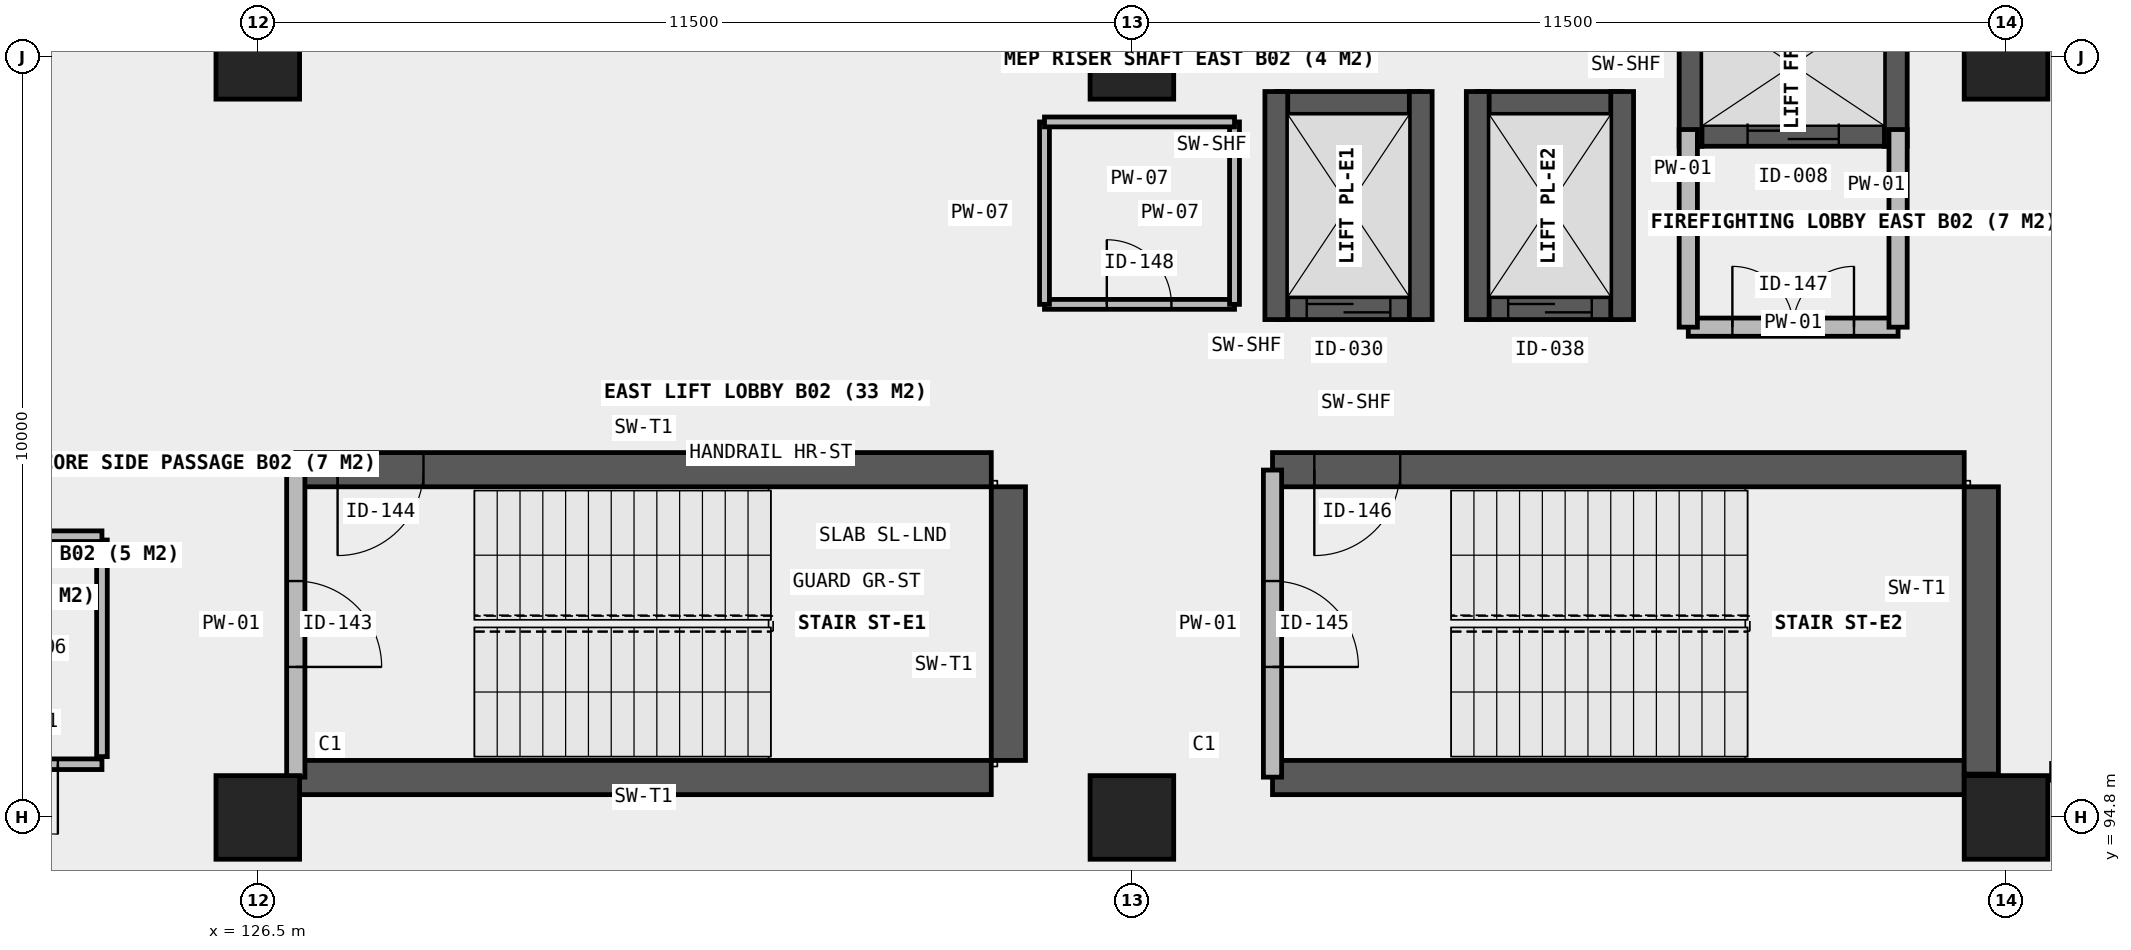
"""IFC4 building model, lengths in metres.
Left out: names, types, materials, properties, quantities, classifications, styles, units other than length and angle.
Written with IfcOpenShell. Run it as: python <this file> out.ifc"""

import sys

from ifc_helpers import new_model, si_unit, direction, frame, frame_2d, origin, origin_2d, place, context, subcontext, project, spatial, rectangle, extrude, element, fill, save


model = new_model("IFC4")
c1 = context("Model", 3, precision=1e-05, world=origin(), true_north=direction((0.0, 1.0)))
c2 = subcontext(c1, "Body", "Model", "MODEL_VIEW")
j1 = project(units=[si_unit("LENGTHUNIT", "METRE"), si_unit("PLANEANGLEUNIT", "RADIAN")], contexts=[c1])
p1 = place(None, origin())
s1 = spatial("IfcSite", under=j1, at=p1, CompositionType="ELEMENT")
p2 = place(p1, origin())
s2 = spatial("IfcBuilding", under=s1, at=p2, CompositionType="ELEMENT")
p3 = place(p2, frame((0.0, 0.0, -8.4)))
s3 = spatial("IfcBuildingStorey", under=s2, at=p3, CompositionType="ELEMENT", Elevation=-8.4)
for number, where, z_axis, x_axis in (
    (1, (126.5, 94.8, 0.0), (0.0, 0.0, 1.0), (1.0, 0.0, 0.0)),
    (2, (126.5, 104.8, 0.0), (0.0, 0.0, 1.0), (1.0, 0.0, 0.0)),
    (3, (138.0, 94.8, 0.0), (0.0, 0.0, 1.0), (1.0, 0.0, 0.0)),
    (4, (138.0, 104.8, 0.0), (0.0, 0.0, 1.0), (1.0, 0.0, 0.0)),
    (5, (149.5, 94.8, 0.0), (0.0, 0.0, 1.0), (1.0, 0.0, 0.0)),
    (6, (149.5, 104.8, 0.0), (0.0, 0.0, 1.0), (1.0, 0.0, 0.0)),
):
    element("IfcColumn", number, at=place(p3, frame(where, z_axis=z_axis, x_axis=x_axis)), inside=s3, PredefinedType="COLUMN", context=c2, shape_type="SweptSolid", body=[
        extrude(rectangle(XDim=1.1, YDim=1.1, at=origin_2d()), origin(), (0.0, 0.0, 1.0), 4.2),
    ])
p4 = place(p3, frame((145.35, 103.78, 0.0), z_axis=(0.0, 0.0, 1.0), x_axis=(1.0, 0.0, 0.0)))
e7 = element("IfcWall", 7, at=p4, inside=s3, PredefinedType="SHEAR", context=c2, shape_type="SweptSolid", body=[
    extrude(rectangle(XDim=2.7, YDim=0.3, at=frame_2d((1.35, 0.0))), origin(), (0.0, 0.0, 1.0), 4.2),
])
p5 = place(p4, frame((0.75, 0.0, 0.0)))
e8 = element("IfcOpeningElement", 8, at=p5, cuts=e7, PredefinedType="OPENING", context=c2, shape_type="SweptSolid", body=[
    extrude(rectangle(XDim=1.2, YDim=2.15, at=frame_2d((0.6, 1.075))), frame((0.0, 0.16, 0.0), z_axis=(0.0, -1.0, 0.0), x_axis=(1.0, 0.0, 0.0)), (0.0, 0.0, 1.0), 0.32),
])
for number, where, z_axis, x_axis in (
    (9, (145.35, 103.63, 0.0), (0.0, 0.0, 1.0), (0.0, 1.0, 0.0)),
    (10, (148.05, 103.63, 0.0), (0.0, 0.0, 1.0), (0.0, 1.0, 0.0)),
):
    element("IfcWall", number, at=place(p3, frame(where, z_axis=z_axis, x_axis=x_axis)), inside=s3, PredefinedType="SHEAR", context=c2, shape_type="SweptSolid", body=[
        extrude(rectangle(XDim=2.14, YDim=0.3, at=frame_2d((1.07, 0.0))), origin(), (0.0, 0.0, 1.0), 4.2),
    ])
p6 = place(p3, frame((139.9, 101.5, 0.0), z_axis=(0.0, 0.0, 1.0), x_axis=(1.0, 0.0, 0.0)))
e11 = element("IfcWall", 11, at=p6, inside=s3, PredefinedType="SHEAR", context=c2, shape_type="SweptSolid", body=[
    extrude(rectangle(XDim=1.9, YDim=0.3, at=frame_2d((0.95, 0.0))), origin(), (0.0, 0.0, 1.0), 4.2),
])
p7 = place(p6, frame((0.4, 0.0, 0.0)))
e12 = element("IfcOpeningElement", 12, at=p7, cuts=e11, PredefinedType="OPENING", context=c2, shape_type="SweptSolid", body=[
    extrude(rectangle(XDim=1.1, YDim=2.15, at=frame_2d((0.55, 1.075))), frame((0.0, 0.16, 0.0), z_axis=(0.0, -1.0, 0.0), x_axis=(1.0, 0.0, 0.0)), (0.0, 0.0, 1.0), 0.32),
])
p8 = place(p3, frame((139.9, 104.2, 0.0), z_axis=(0.0, 0.0, 1.0), x_axis=(1.0, 0.0, 0.0)))
e13 = element("IfcWall", 13, at=p8, inside=s3, PredefinedType="SHEAR", context=c2, shape_type="SweptSolid", body=[
    extrude(rectangle(XDim=1.9, YDim=0.3, at=frame_2d((0.95, 0.0))), origin(), (0.0, 0.0, 1.0), 4.2),
])
for number, where, z_axis, x_axis in (
    (14, (139.9, 101.35, 0.0), (0.0, 0.0, 1.0), (0.0, 1.0, 0.0)),
    (15, (141.8, 101.35, 0.0), (0.0, 0.0, 1.0), (0.0, 1.0, 0.0)),
):
    element("IfcWall", number, at=place(p3, frame(where, z_axis=z_axis, x_axis=x_axis)), inside=s3, PredefinedType="SHEAR", context=c2, shape_type="SweptSolid", body=[
        extrude(rectangle(XDim=3.0, YDim=0.3, at=frame_2d((1.5, 0.0))), origin(), (0.0, 0.0, 1.0), 4.2),
    ])
p9 = place(p3, frame((142.55, 101.5, 0.0), z_axis=(0.0, 0.0, 1.0), x_axis=(1.0, 0.0, 0.0)))
e16 = element("IfcWall", 16, at=p9, inside=s3, PredefinedType="SHEAR", context=c2, shape_type="SweptSolid", body=[
    extrude(rectangle(XDim=1.9, YDim=0.3, at=frame_2d((0.95, 0.0))), origin(), (0.0, 0.0, 1.0), 4.2),
])
p10 = place(p9, frame((0.4, 0.0, 0.0)))
e17 = element("IfcOpeningElement", 17, at=p10, cuts=e16, PredefinedType="OPENING", context=c2, shape_type="SweptSolid", body=[
    extrude(rectangle(XDim=1.1, YDim=2.15, at=frame_2d((0.55, 1.075))), frame((0.0, 0.16, 0.0), z_axis=(0.0, -1.0, 0.0), x_axis=(1.0, 0.0, 0.0)), (0.0, 0.0, 1.0), 0.32),
])
p11 = place(p3, frame((142.55, 104.2, 0.0), z_axis=(0.0, 0.0, 1.0), x_axis=(1.0, 0.0, 0.0)))
e18 = element("IfcWall", 18, at=p11, inside=s3, PredefinedType="SHEAR", context=c2, shape_type="SweptSolid", body=[
    extrude(rectangle(XDim=1.9, YDim=0.3, at=frame_2d((0.95, 0.0))), origin(), (0.0, 0.0, 1.0), 4.2),
])
for number, where, z_axis, x_axis in (
    (19, (142.55, 101.35, 0.0), (0.0, 0.0, 1.0), (0.0, 1.0, 0.0)),
    (20, (144.45, 101.35, 0.0), (0.0, 0.0, 1.0), (0.0, 1.0, 0.0)),
):
    element("IfcWall", number, at=place(p3, frame(where, z_axis=z_axis, x_axis=x_axis)), inside=s3, PredefinedType="SHEAR", context=c2, shape_type="SweptSolid", body=[
        extrude(rectangle(XDim=3.0, YDim=0.3, at=frame_2d((1.5, 0.0))), origin(), (0.0, 0.0, 1.0), 4.2),
    ])
p12 = place(p3, frame((127.0, 95.325, 0.0), z_axis=(0.0, 0.0, 1.0), x_axis=(1.0, 0.0, 0.0)))
e21 = element("IfcWall", 21, at=p12, inside=s3, PredefinedType="SHEAR", context=c2, shape_type="SweptSolid", body=[
    extrude(rectangle(XDim=9.15, YDim=0.45, at=frame_2d((4.575, 0.0))), origin(), (0.0, 0.0, 1.0), 4.2),
])
p13 = place(p3, frame((127.0, 99.375, 0.0), z_axis=(0.0, 0.0, 1.0), x_axis=(1.0, 0.0, 0.0)))
e22 = element("IfcWall", 22, at=p13, inside=s3, PredefinedType="SHEAR", context=c2, shape_type="SweptSolid", body=[
    extrude(rectangle(XDim=9.15, YDim=0.45, at=frame_2d((4.575, 0.0))), origin(), (0.0, 0.0, 1.0), 4.2),
])
p14 = place(p13, frame((0.55, 0.0, 0.0)))
e23 = element("IfcOpeningElement", 23, at=p14, cuts=e22, PredefinedType="OPENING", context=c2, shape_type="SweptSolid", body=[
    extrude(rectangle(XDim=1.13, YDim=2.15, at=frame_2d((0.565, 1.075))), frame((0.0, 0.235, 0.0), z_axis=(0.0, -1.0, 0.0), x_axis=(1.0, 0.0, 0.0)), (0.0, 0.0, 1.0), 0.47),
])
p15 = place(p3, frame((136.375, 95.55, 0.0), z_axis=(0.0, 0.0, 1.0), x_axis=(0.0, 1.0, 0.0)))
e24 = element("IfcWall", 24, at=p15, inside=s3, PredefinedType="SHEAR", context=c2, shape_type="SweptSolid", body=[
    extrude(rectangle(XDim=3.6, YDim=0.45, at=frame_2d((1.8, 0.0))), origin(), (0.0, 0.0, 1.0), 4.2),
])
p16 = place(p3, frame((139.85, 95.325, 0.0), z_axis=(0.0, 0.0, 1.0), x_axis=(1.0, 0.0, 0.0)))
e25 = element("IfcWall", 25, at=p16, inside=s3, PredefinedType="SHEAR", context=c2, shape_type="SweptSolid", body=[
    extrude(rectangle(XDim=9.1, YDim=0.45, at=frame_2d((4.55, 0.0))), origin(), (0.0, 0.0, 1.0), 4.2),
])
p17 = place(p3, frame((139.85, 99.375, 0.0), z_axis=(0.0, 0.0, 1.0), x_axis=(1.0, 0.0, 0.0)))
e26 = element("IfcWall", 26, at=p17, inside=s3, PredefinedType="SHEAR", context=c2, shape_type="SweptSolid", body=[
    extrude(rectangle(XDim=9.1, YDim=0.45, at=frame_2d((4.55, 0.0))), origin(), (0.0, 0.0, 1.0), 4.2),
])
p18 = place(p17, frame((0.55, 0.0, 0.0)))
e27 = element("IfcOpeningElement", 27, at=p18, cuts=e26, PredefinedType="OPENING", context=c2, shape_type="SweptSolid", body=[
    extrude(rectangle(XDim=1.13, YDim=2.15, at=frame_2d((0.565, 1.075))), frame((0.0, 0.235, 0.0), z_axis=(0.0, -1.0, 0.0), x_axis=(1.0, 0.0, 0.0)), (0.0, 0.0, 1.0), 0.47),
])
p19 = place(p3, frame((149.175, 95.37, 0.0), z_axis=(0.0, 0.0, 1.0), x_axis=(0.0, 1.0, 0.0)))
e28 = element("IfcWall", 28, at=p19, inside=s3, PredefinedType="SHEAR", context=c2, shape_type="SweptSolid", body=[
    extrude(rectangle(XDim=3.78, YDim=0.45, at=frame_2d((1.89, 0.0))), origin(), (0.0, 0.0, 1.0), 4.2),
])
p20 = place(p3, frame((127.0, 95.33, 0.0), z_axis=(0.0, 0.0, 1.0), x_axis=(0.0, 1.0, 0.0)))
e29 = element("IfcWall", 29, at=p20, inside=s3, PredefinedType="SOLIDWALL", context=c2, shape_type="SweptSolid", body=[
    extrude(rectangle(XDim=4.04, YDim=0.24, at=frame_2d((2.02, 0.0))), origin(), (0.0, 0.0, 1.0), 3.9),
])
p21 = place(p20, frame((1.45, 0.0, 0.0)))
e30 = element("IfcOpeningElement", 30, at=p21, cuts=e29, PredefinedType="OPENING", context=c2, shape_type="SweptSolid", body=[
    extrude(rectangle(XDim=1.13, YDim=2.15, at=frame_2d((0.565, 1.075))), frame((0.0, 0.13, 0.0), z_axis=(0.0, -1.0, 0.0), x_axis=(1.0, 0.0, 0.0)), (0.0, 0.0, 1.0), 0.26),
])
p22 = place(p3, frame((139.85, 95.33, 0.0), z_axis=(0.0, 0.0, 1.0), x_axis=(0.0, 1.0, 0.0)))
e31 = element("IfcWall", 31, at=p22, inside=s3, PredefinedType="SOLIDWALL", context=c2, shape_type="SweptSolid", body=[
    extrude(rectangle(XDim=4.04, YDim=0.24, at=frame_2d((2.02, 0.0))), origin(), (0.0, 0.0, 1.0), 3.9),
])
p23 = place(p22, frame((1.45, 0.0, 0.0)))
e32 = element("IfcOpeningElement", 32, at=p23, cuts=e31, PredefinedType="OPENING", context=c2, shape_type="SweptSolid", body=[
    extrude(rectangle(XDim=1.13, YDim=2.15, at=frame_2d((0.565, 1.075))), frame((0.0, 0.13, 0.0), z_axis=(0.0, -1.0, 0.0), x_axis=(1.0, 0.0, 0.0)), (0.0, 0.0, 1.0), 0.26),
])
p24 = place(p3, frame((145.32, 101.25, 0.0), z_axis=(0.0, 0.0, 1.0), x_axis=(1.0, 0.0, 0.0)))
e33 = element("IfcWall", 33, at=p24, inside=s3, PredefinedType="SOLIDWALL", context=c2, shape_type="SweptSolid", body=[
    extrude(rectangle(XDim=2.76, YDim=0.24, at=frame_2d((1.38, 0.0))), origin(), (0.0, 0.0, 1.0), 3.9),
])
p25 = place(p24, frame((0.58, 0.0, 0.0)))
e34 = element("IfcOpeningElement", 34, at=p25, cuts=e33, PredefinedType="OPENING", context=c2, shape_type="SweptSolid", body=[
    extrude(rectangle(XDim=1.6, YDim=2.15, at=frame_2d((0.8, 1.075))), frame((0.0, 0.13, 0.0), z_axis=(0.0, -1.0, 0.0), x_axis=(1.0, 0.0, 0.0)), (0.0, 0.0, 1.0), 0.26),
])
for number, where, z_axis, x_axis in (
    (35, (145.32, 101.25, 0.0), (0.0, 0.0, 1.0), (0.0, 1.0, 0.0)),
    (36, (148.08, 101.25, 0.0), (0.0, 0.0, 1.0), (0.0, 1.0, 0.0)),
):
    element("IfcWall", number, at=place(p3, frame(where, z_axis=z_axis, x_axis=x_axis)), inside=s3, PredefinedType="SOLIDWALL", context=c2, shape_type="SweptSolid", body=[
        extrude(rectangle(XDim=2.6, YDim=0.24, at=frame_2d((1.3, 0.0))), origin(), (0.0, 0.0, 1.0), 3.9),
    ])
p26 = place(p3, frame((136.85, 101.55, 0.0), z_axis=(0.0, 0.0, 1.0), x_axis=(1.0, 0.0, 0.0)))
e37 = element("IfcWall", 37, at=p26, inside=s3, PredefinedType="PLUMBINGWALL", context=c2, shape_type="SweptSolid", body=[
    extrude(rectangle(XDim=2.5, YDim=0.13, at=frame_2d((1.25, 0.0))), origin(), (0.0, 0.0, 1.0), 3.9),
])
p27 = place(p26, frame((0.82, 0.0, 0.0)))
e38 = element("IfcOpeningElement", 38, at=p27, cuts=e37, PredefinedType="OPENING", context=c2, shape_type="SweptSolid", body=[
    extrude(rectangle(XDim=0.85, YDim=2.0, at=frame_2d((0.425, 1.0))), frame((0.0, 0.075, 0.0), z_axis=(0.0, -1.0, 0.0), x_axis=(1.0, 0.0, 0.0)), (0.0, 0.0, 1.0), 0.15),
])
for number, where, z_axis, x_axis in (
    (39, (136.85, 101.55, 0.0), (0.0, 0.0, 1.0), (0.0, 1.0, 0.0)),
    (40, (139.35, 101.55, 0.0), (0.0, 0.0, 1.0), (0.0, 1.0, 0.0)),
):
    element("IfcWall", number, at=place(p3, frame(where, z_axis=z_axis, x_axis=x_axis)), inside=s3, PredefinedType="PLUMBINGWALL", context=c2, shape_type="SweptSolid", body=[
        extrude(rectangle(XDim=2.4, YDim=0.13, at=frame_2d((1.2, 0.0))), origin(), (0.0, 0.0, 1.0), 3.9),
    ])
p28 = place(p3, frame((136.85, 103.95, 0.0), z_axis=(0.0, 0.0, 1.0), x_axis=(1.0, 0.0, 0.0)))
e41 = element("IfcWall", 41, at=p28, inside=s3, PredefinedType="PLUMBINGWALL", context=c2, shape_type="SweptSolid", body=[
    extrude(rectangle(XDim=2.5, YDim=0.13, at=frame_2d((1.25, 0.0))), origin(), (0.0, 0.0, 1.0), 3.9),
])
p29 = place(p3, frame((118.15, 95.5, 0.0), z_axis=(0.0, 0.0, 1.0), x_axis=(1.0, 0.0, 0.0)))
e42 = element("IfcWall", 42, at=p29, inside=s3, PredefinedType="PLUMBINGWALL", context=c2, shape_type="SweptSolid", body=[
    extrude(rectangle(XDim=6.3, YDim=0.14, at=frame_2d((3.15, 0.0))), origin(), (0.0, 0.0, 1.0), 3.9),
])
p30 = place(p29, frame((0.72, 0.0, 0.0)))
e43 = element("IfcOpeningElement", 43, at=p30, cuts=e42, PredefinedType="OPENING", context=c2, shape_type="SweptSolid", body=[
    extrude(rectangle(XDim=0.95, YDim=2.1, at=frame_2d((0.475, 1.05))), frame((0.0, 0.08, 0.0), z_axis=(0.0, -1.0, 0.0), x_axis=(1.0, 0.0, 0.0)), (0.0, 0.0, 1.0), 0.16),
])
p31 = place(p29, frame((2.8, 0.0, 0.0)))
e44 = element("IfcOpeningElement", 44, at=p31, cuts=e42, PredefinedType="OPENING", context=c2, shape_type="SweptSolid", body=[
    extrude(rectangle(XDim=0.92, YDim=2.1, at=frame_2d((0.46, 1.05))), frame((0.0, 0.08, 0.0), z_axis=(0.0, -1.0, 0.0), x_axis=(1.0, 0.0, 0.0)), (0.0, 0.0, 1.0), 0.16),
])
p32 = place(p29, frame((4.8, 0.0, 0.0)))
e45 = element("IfcOpeningElement", 45, at=p32, cuts=e42, PredefinedType="OPENING", context=c2, shape_type="SweptSolid", body=[
    extrude(rectangle(XDim=0.92, YDim=2.1, at=frame_2d((0.46, 1.05))), frame((0.0, 0.08, 0.0), z_axis=(0.0, -1.0, 0.0), x_axis=(1.0, 0.0, 0.0)), (0.0, 0.0, 1.0), 0.16),
])
p33 = place(p3, frame((124.45, 95.6, 0.0), z_axis=(0.0, 0.0, 1.0), x_axis=(0.0, 1.0, 0.0)))
e46 = element("IfcWall", 46, at=p33, inside=s3, PredefinedType="PLUMBINGWALL", context=c2, shape_type="SweptSolid", body=[
    extrude(rectangle(XDim=2.85, YDim=0.14, at=frame_2d((1.425, 0.0))), origin(), (0.0, 0.0, 1.0), 3.9),
])
p34 = place(p3, frame((118.15, 98.5, 0.0), z_axis=(0.0, 0.0, 1.0), x_axis=(1.0, 0.0, 0.0)))
e47 = element("IfcWall", 47, at=p34, inside=s3, PredefinedType="PLUMBINGWALL", context=c2, shape_type="SweptSolid", body=[
    extrude(rectangle(XDim=6.3, YDim=0.14, at=frame_2d((3.15, 0.0))), origin(), (0.0, 0.0, 1.0), 3.9),
])
p35 = place(p3, frame((150.1, 95.4, 0.0), z_axis=(0.0, 0.0, 1.0), x_axis=(1.0, 0.0, 0.0)))
e48 = element("IfcWall", 48, at=p35, inside=s3, PredefinedType="SOLIDWALL", context=c2, shape_type="SweptSolid", body=[
    extrude(rectangle(XDim=33.1, YDim=0.22, at=frame_2d((16.55, 0.0))), origin(), (0.0, 0.0, 1.0), 3.9),
])
p36 = place(p35, frame((5.0, 0.0, 0.0)))
e49 = element("IfcOpeningElement", 49, at=p36, cuts=e48, PredefinedType="OPENING", context=c2, shape_type="SweptSolid", body=[
    extrude(rectangle(XDim=2.1, YDim=2.4, at=frame_2d((1.05, 1.2))), frame((0.0, 0.12, 0.0), z_axis=(0.0, -1.0, 0.0), x_axis=(1.0, 0.0, 0.0)), (0.0, 0.0, 1.0), 0.24),
])
p37 = place(p5, origin())
e50 = element("IfcDoor", 50, at=p37, inside=s3, OperationType="SLIDING_TO_RIGHT", PredefinedType="DOOR", context=c2, shape_type="SweptSolid", body=[
    extrude(rectangle(XDim=1.2, YDim=2.15, at=frame_2d((0.6, 1.075))), frame((0.0, 0.025, 0.0), z_axis=(0.0, -1.0, 0.0), x_axis=(1.0, 0.0, 0.0)), (0.0, 0.0, 1.0), 0.05),
])
fill(e8, e50)
p38 = place(p7, origin())
e51 = element("IfcDoor", 51, at=p38, inside=s3, OperationType="SLIDING_TO_LEFT", PredefinedType="DOOR", context=c2, shape_type="SweptSolid", body=[
    extrude(rectangle(XDim=1.1, YDim=2.15, at=frame_2d((0.55, 1.075))), frame((0.0, 0.025, 0.0), z_axis=(0.0, -1.0, 0.0), x_axis=(1.0, 0.0, 0.0)), (0.0, 0.0, 1.0), 0.05),
])
fill(e12, e51)
p39 = place(p10, origin())
e52 = element("IfcDoor", 52, at=p39, inside=s3, OperationType="SLIDING_TO_LEFT", PredefinedType="DOOR", context=c2, shape_type="SweptSolid", body=[
    extrude(rectangle(XDim=1.1, YDim=2.15, at=frame_2d((0.55, 1.075))), frame((0.0, 0.025, 0.0), z_axis=(0.0, -1.0, 0.0), x_axis=(1.0, 0.0, 0.0)), (0.0, 0.0, 1.0), 0.05),
])
fill(e17, e52)
p40 = place(p21, frame((0.565, 0.0, 0.0), z_axis=(0.0, 0.0, 1.0), x_axis=(-1.0, 0.0, 0.0)))
e53 = element("IfcDoor", 53, at=p40, inside=s3, OperationType="SINGLE_SWING_LEFT", PredefinedType="DOOR", context=c2, shape_type="SweptSolid", body=[
    extrude(rectangle(XDim=1.13, YDim=2.15, at=frame_2d((0.0, 1.075))), frame((0.0, 0.025, 0.0), z_axis=(0.0, -1.0, 0.0), x_axis=(1.0, 0.0, 0.0)), (0.0, 0.0, 1.0), 0.05),
])
fill(e30, e53)
p41 = place(p14, frame((0.565, 0.0, 0.0), z_axis=(0.0, 0.0, 1.0), x_axis=(-1.0, 0.0, 0.0)))
e54 = element("IfcDoor", 54, at=p41, inside=s3, OperationType="SINGLE_SWING_LEFT", PredefinedType="DOOR", context=c2, shape_type="SweptSolid", body=[
    extrude(rectangle(XDim=1.13, YDim=2.15, at=frame_2d((0.0, 1.075))), frame((0.0, 0.025, 0.0), z_axis=(0.0, -1.0, 0.0), x_axis=(1.0, 0.0, 0.0)), (0.0, 0.0, 1.0), 0.05),
])
fill(e23, e54)
p42 = place(p23, frame((0.565, 0.0, 0.0), z_axis=(0.0, 0.0, 1.0), x_axis=(-1.0, 0.0, 0.0)))
e55 = element("IfcDoor", 55, at=p42, inside=s3, OperationType="SINGLE_SWING_LEFT", PredefinedType="DOOR", context=c2, shape_type="SweptSolid", body=[
    extrude(rectangle(XDim=1.13, YDim=2.15, at=frame_2d((0.0, 1.075))), frame((0.0, 0.025, 0.0), z_axis=(0.0, -1.0, 0.0), x_axis=(1.0, 0.0, 0.0)), (0.0, 0.0, 1.0), 0.05),
])
fill(e32, e55)
p43 = place(p18, frame((0.565, 0.0, 0.0), z_axis=(0.0, 0.0, 1.0), x_axis=(-1.0, 0.0, 0.0)))
e56 = element("IfcDoor", 56, at=p43, inside=s3, OperationType="SINGLE_SWING_LEFT", PredefinedType="DOOR", context=c2, shape_type="SweptSolid", body=[
    extrude(rectangle(XDim=1.13, YDim=2.15, at=frame_2d((0.0, 1.075))), frame((0.0, 0.025, 0.0), z_axis=(0.0, -1.0, 0.0), x_axis=(1.0, 0.0, 0.0)), (0.0, 0.0, 1.0), 0.05),
])
fill(e27, e56)
p44 = place(p25, origin())
e57 = element("IfcDoor", 57, at=p44, inside=s3, OperationType="DOUBLE_DOOR_SINGLE_SWING", PredefinedType="DOOR", context=c2, shape_type="SweptSolid", body=[
    extrude(rectangle(XDim=1.6, YDim=2.15, at=frame_2d((0.8, 1.075))), frame((0.0, 0.025, 0.0), z_axis=(0.0, -1.0, 0.0), x_axis=(1.0, 0.0, 0.0)), (0.0, 0.0, 1.0), 0.05),
])
fill(e34, e57)
p45 = place(p27, origin())
e58 = element("IfcDoor", 58, at=p45, inside=s3, OperationType="SINGLE_SWING_LEFT", PredefinedType="TRAPDOOR", context=c2, shape_type="SweptSolid", body=[
    extrude(rectangle(XDim=0.85, YDim=2.0, at=frame_2d((0.425, 1.0))), frame((0.0, 0.025, 0.0), z_axis=(0.0, -1.0, 0.0), x_axis=(1.0, 0.0, 0.0)), (0.0, 0.0, 1.0), 0.05),
])
fill(e38, e58)
p46 = place(p32, origin())
e59 = element("IfcDoor", 59, at=p46, inside=s3, OperationType="SINGLE_SWING_RIGHT", PredefinedType="DOOR", context=c2, shape_type="SweptSolid", body=[
    extrude(rectangle(XDim=0.92, YDim=2.1, at=frame_2d((0.46, 1.05))), frame((0.0, 0.025, 0.0), z_axis=(0.0, -1.0, 0.0), x_axis=(1.0, 0.0, 0.0)), (0.0, 0.0, 1.0), 0.05),
])
fill(e45, e59)
save(model, sys.argv[1])
